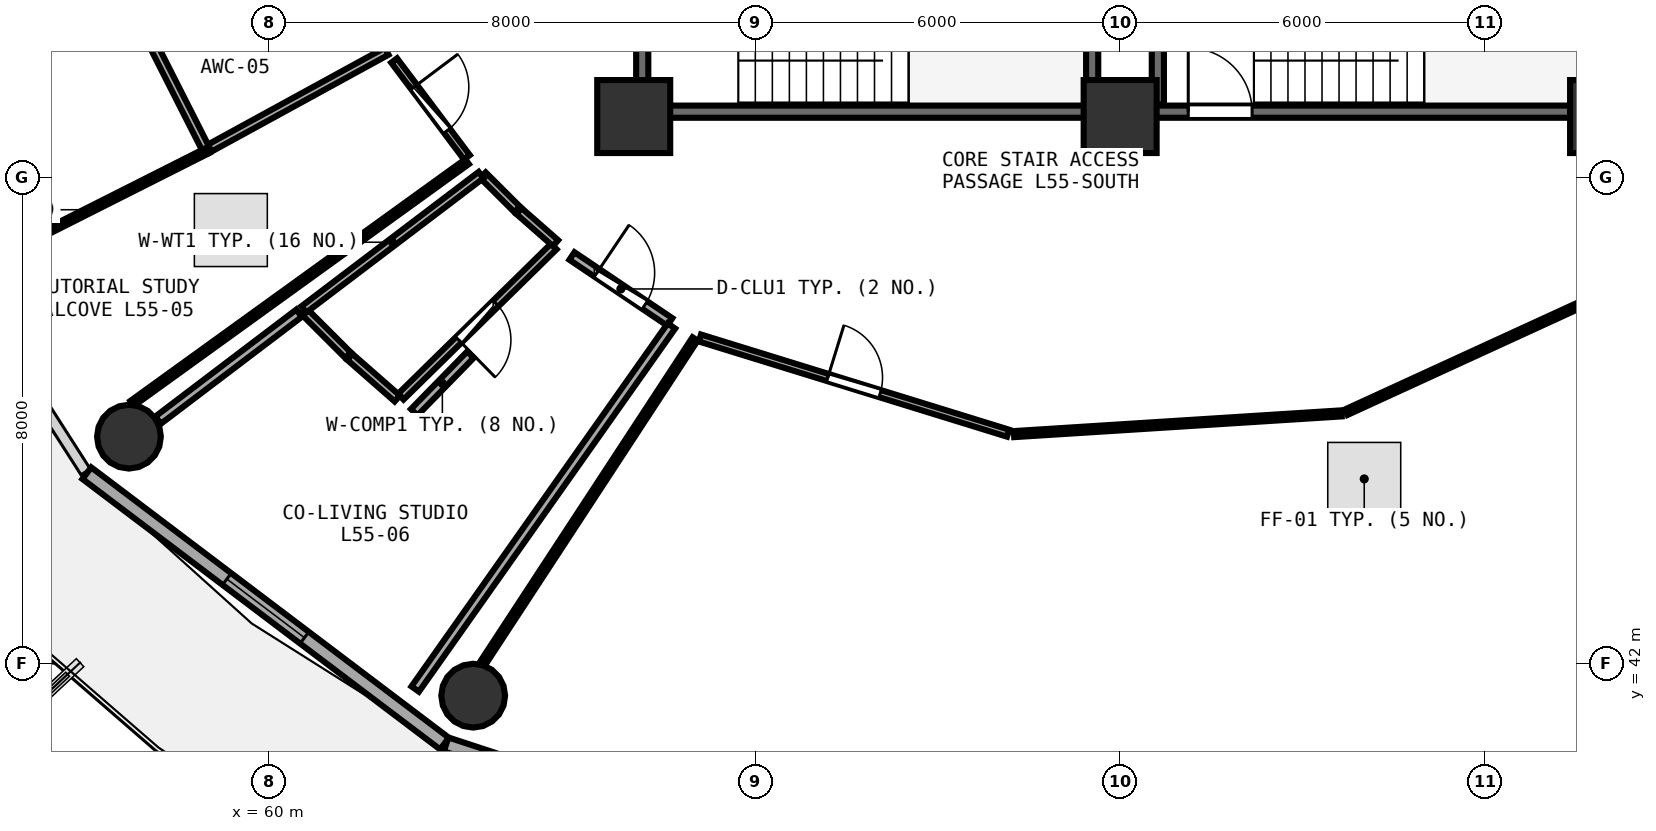
"""IFC4 building model, lengths in metres.
Left out: names, types, materials, properties, quantities, classifications, styles, units other than length and angle.
Written with IfcOpenShell. Run it as: python <this file> out.ifc"""

import sys

from ifc_helpers import new_model, si_unit, direction, frame, frame_2d, origin, origin_2d, place, context, subcontext, project, spatial, rectangle, circle, extrude, element, fill, save


model = new_model("IFC4")
c1 = context("Model", 3, precision=1e-05, world=origin(), true_north=direction((0.0, 1.0)))
c2 = subcontext(c1, "Body", "Model", "MODEL_VIEW")
j1 = project(units=[si_unit("LENGTHUNIT", "METRE"), si_unit("PLANEANGLEUNIT", "RADIAN")], contexts=[c1])
p1 = place(None, origin())
s1 = spatial("IfcSite", under=j1, at=p1, CompositionType="ELEMENT")
p2 = place(p1, origin())
s2 = spatial("IfcBuilding", under=s1, at=p2, CompositionType="ELEMENT")
p3 = place(p2, frame((0.0, 0.0, 215.7)))
s3 = spatial("IfcBuildingStorey", under=s2, at=p3, CompositionType="ELEMENT", Elevation=215.7)
for number, where, z_axis, x_axis in (
    (1, (66.0, 51.0, 0.0), (0.0, 0.0, 1.0), (1.0, 0.0, 0.0)),
    (2, (74.0, 51.0, 0.0), (0.0, 0.0, 1.0), (1.0, 0.0, 0.0)),
    (3, (82.0, 51.0, 0.0), (0.0, 0.0, 1.0), (1.0, 0.0, 0.0)),
):
    element("IfcColumn", number, at=place(p3, frame(where, z_axis=z_axis, x_axis=x_axis)), inside=s3, PredefinedType="PILASTER", context=c2, shape_type="SweptSolid", body=[
        extrude(rectangle(XDim=1.2, YDim=1.2, at=origin_2d()), origin(), (0.0, 0.0, 1.0), 3.75),
    ])
for number, where, z_axis, x_axis in (
    (4, (57.698, 45.736, 0.0), (0.0, 0.0, 1.0), (1.0, 0.0, 0.0)),
    (5, (63.36, 41.476, 0.0), (0.0, 0.0, 1.0), (1.0, 0.0, 0.0)),
):
    element("IfcColumn", number, at=place(p3, frame(where, z_axis=z_axis, x_axis=x_axis)), inside=s3, PredefinedType="COLUMN", context=c2, shape_type="SweptSolid", body=[
        extrude(circle(Radius=0.525, at=origin_2d()), origin(), (0.0, 0.0, 1.0), 3.75),
    ])
p4 = place(p3, frame((57.006, 45.135, 0.0), z_axis=(0.0, 0.0, 1.0), x_axis=(0.797701674595, -0.603052268338, 0.0)))
e6 = element("IfcWall", 6, at=p4, inside=s3, PredefinedType="SOLIDWALL", context=c2, shape_type="SweptSolid", body=[
    extrude(rectangle(XDim=7.374, YDim=0.24, at=frame_2d((3.687, 0.0))), origin(), (0.0, 0.0, 1.0), 3.475),
])
p5 = place(p4, frame((2.887, 0.0, 0.85)))
e7 = element("IfcOpeningElement", 7, at=p5, cuts=e6, PredefinedType="OPENING", context=c2, shape_type="SweptSolid", body=[
    extrude(rectangle(XDim=1.6, YDim=1.45, at=frame_2d((0.8, 0.725))), frame((0.0, 0.13, 0.0), z_axis=(0.0, -1.0, 0.0), x_axis=(1.0, 0.0, 0.0)), (0.0, 0.0, 1.0), 0.26),
])
p6 = place(p3, frame((62.914, 40.675, 0.0), z_axis=(0.0, 0.0, 1.0), x_axis=(0.95022142767, -0.31157541366, 0.0)))
e8 = element("IfcWall", 8, at=p6, inside=s3, PredefinedType="SOLIDWALL", context=c2, shape_type="SweptSolid", body=[
    extrude(rectangle(XDim=7.594, YDim=0.24, at=frame_2d((3.797, 0.0))), origin(), (0.0, 0.0, 1.0), 3.475),
])
p7 = place(p6, frame((2.997, 0.0, 0.85)))
e9 = element("IfcOpeningElement", 9, at=p7, cuts=e8, PredefinedType="OPENING", context=c2, shape_type="SweptSolid", body=[
    extrude(rectangle(XDim=1.6, YDim=1.45, at=frame_2d((0.8, 0.725))), frame((0.0, 0.13, 0.0), z_axis=(0.0, -1.0, 0.0), x_axis=(1.0, 0.0, 0.0)), (0.0, 0.0, 1.0), 0.26),
])
p8 = place(p3, frame((74.0, 51.08, 0.0), z_axis=(0.0, 0.0, 1.0), x_axis=(1.0, 0.0, 0.0)))
e10 = element("IfcWall", 10, at=p8, inside=s3, PredefinedType="SHEAR", context=c2, shape_type="SweptSolid", body=[
    extrude(rectangle(XDim=7.9, YDim=0.2, at=frame_2d((3.95, 0.0))), origin(), (0.0, 0.0, 1.0), 3.49),
])
p9 = place(p8, frame((1.12, 0.0, 0.0)))
e11 = element("IfcOpeningElement", 11, at=p9, cuts=e10, PredefinedType="OPENING", context=c2, shape_type="SweptSolid", body=[
    extrude(rectangle(XDim=1.05, YDim=2.1, at=frame_2d((0.525, 1.05))), frame((0.0, 0.11, 0.0), z_axis=(0.0, -1.0, 0.0), x_axis=(1.0, 0.0, 0.0)), (0.0, 0.0, 1.0), 0.22),
])
p10 = place(p3, frame((74.62, 54.27, 0.0), z_axis=(0.0, 0.0, 1.0), x_axis=(0.0, -1.0, 0.0)))
e12 = element("IfcWall", 12, at=p10, inside=s3, PredefinedType="SHEAR", context=c2, shape_type="SweptSolid", body=[
    extrude(rectangle(XDim=3.07, YDim=0.2, at=frame_2d((1.535, 0.0))), origin(), (0.0, 0.0, 1.0), 3.49),
])
p11 = place(p3, frame((66.26, 51.08, 0.0), z_axis=(0.0, 0.0, 1.0), x_axis=(1.0, 0.0, 0.0)))
e13 = element("IfcWall", 13, at=p11, inside=s3, PredefinedType="SHEAR", context=c2, shape_type="SweptSolid", body=[
    extrude(rectangle(XDim=7.16, YDim=0.2, at=frame_2d((3.58, 0.0))), origin(), (0.0, 0.0, 1.0), 3.49),
])
p12 = place(p3, frame((73.54, 51.2, 0.0), z_axis=(0.0, 0.0, 1.0), x_axis=(0.0, 1.0, 0.0)))
e14 = element("IfcWall", 14, at=p12, inside=s3, PredefinedType="SHEAR", context=c2, shape_type="SweptSolid", body=[
    extrude(rectangle(XDim=3.07, YDim=0.2, at=frame_2d((1.535, 0.0))), origin(), (0.0, 0.0, 1.0), 3.49),
])
p13 = place(p3, frame((66.14, 54.27, 0.0), z_axis=(0.0, 0.0, 1.0), x_axis=(0.0, -1.0, 0.0)))
e15 = element("IfcWall", 15, at=p13, inside=s3, PredefinedType="SHEAR", context=c2, shape_type="SweptSolid", body=[
    extrude(rectangle(XDim=3.07, YDim=0.2, at=frame_2d((1.535, 0.0))), origin(), (0.0, 0.0, 1.0), 3.49),
])
p14 = place(p13, frame((1.01, 0.0, 0.0)))
e16 = element("IfcOpeningElement", 16, at=p14, cuts=e15, PredefinedType="OPENING", context=c2, shape_type="SweptSolid", body=[
    extrude(rectangle(XDim=1.05, YDim=2.1, at=frame_2d((0.525, 1.05))), frame((0.0, 0.11, 0.0), z_axis=(0.0, -1.0, 0.0), x_axis=(1.0, 0.0, 0.0)), (0.0, 0.0, 1.0), 0.22),
])
p15 = place(p3, frame((67.088, 47.358, 0.0), z_axis=(0.0, 0.0, 1.0), x_axis=(0.955451026591, -0.295149683696, 0.0)))
e17 = element("IfcWall", 17, at=p15, inside=s3, PredefinedType="PARTITIONING", context=c2, shape_type="SweptSolid", body=[
    extrude(rectangle(XDim=5.305, YDim=0.12, at=frame_2d((2.652, 0.0))), origin(), (0.0, 0.0, 1.0), 3.235),
])
p16 = place(p15, frame((2.202, 0.0, 0.0)))
e18 = element("IfcOpeningElement", 18, at=p16, cuts=e17, PredefinedType="OPENING", context=c2, shape_type="SweptSolid", body=[
    extrude(rectangle(XDim=0.9, YDim=2.08, at=frame_2d((0.45, 1.04))), frame((0.0, 0.07, 0.0), z_axis=(0.0, -1.0, 0.0), x_axis=(1.0, 0.0, 0.0)), (0.0, 0.0, 1.0), 0.14),
])
p17 = place(p3, frame((62.06, 51.922, 0.0), z_axis=(0.0, 0.0, 1.0), x_axis=(0.600647163637, -0.799514218019, 0.0)))
e19 = element("IfcWall", 19, at=p17, inside=s3, PredefinedType="PARTITIONING", context=c2, shape_type="SweptSolid", body=[
    extrude(rectangle(XDim=1.991, YDim=0.12, at=frame_2d((0.996, 0.0))), origin(), (0.0, 0.0, 1.0), 3.025),
])
p18 = place(p17, frame((0.546, 0.0, 0.0)))
e20 = element("IfcOpeningElement", 20, at=p18, cuts=e19, PredefinedType="OPENING", context=c2, shape_type="SweptSolid", body=[
    extrude(rectangle(XDim=0.9, YDim=2.08, at=frame_2d((0.45, 1.04))), frame((0.0, 0.07, 0.0), z_axis=(0.0, -1.0, 0.0), x_axis=(1.0, 0.0, 0.0)), (0.0, 0.0, 1.0), 0.14),
])
p19 = place(p3, frame((64.686, 48.863, 0.0), z_axis=(0.0, 0.0, 1.0), x_axis=(-0.713685369918, -0.700466410875, 0.0)))
e21 = element("IfcWall", 21, at=p19, inside=s3, PredefinedType="PLUMBINGWALL", context=c2, shape_type="SweptSolid", body=[
    extrude(rectangle(XDim=3.528, YDim=0.13, at=frame_2d((1.764, 0.0))), origin(), (0.0, 0.0, 1.0), 3.175),
])
p20 = place(p19, frame((1.334, 0.0, 0.0)))
e22 = element("IfcOpeningElement", 22, at=p20, cuts=e21, PredefinedType="OPENING", context=c2, shape_type="SweptSolid", body=[
    extrude(rectangle(XDim=0.86, YDim=2.05, at=frame_2d((0.43, 1.025))), frame((0.0, 0.075, 0.0), z_axis=(0.0, -1.0, 0.0), x_axis=(1.0, 0.0, 0.0)), (0.0, 0.0, 1.0), 0.15),
])
p21 = place(p3, frame((64.984, 48.707, 0.0), z_axis=(0.0, 0.0, 1.0), x_axis=(0.829408373073, -0.558642775553, 0.0)))
e23 = element("IfcWall", 23, at=p21, inside=s3, PredefinedType="PARTITIONING", context=c2, shape_type="SweptSolid", body=[
    extrude(rectangle(XDim=1.94, YDim=0.15, at=frame_2d((0.97, 0.0))), origin(), (0.0, 0.0, 1.0), 3.025),
])
p22 = place(p21, frame((0.495, 0.0, 0.0)))
e24 = element("IfcOpeningElement", 24, at=p22, cuts=e23, PredefinedType="OPENING", context=c2, shape_type="SweptSolid", body=[
    extrude(rectangle(XDim=0.95, YDim=2.08, at=frame_2d((0.475, 1.04))), frame((0.0, 0.085, 0.0), z_axis=(0.0, -1.0, 0.0), x_axis=(1.0, 0.0, 0.0)), (0.0, 0.0, 1.0), 0.17),
])
p23 = place(p3, frame((72.254, 45.778, 0.0), z_axis=(0.0, 0.0, 1.0), x_axis=(0.99800477295, 0.063138523658, 0.0)))
e25 = element("IfcWall", 25, at=p23, inside=s3, PredefinedType="PARTITIONING", context=c2, shape_type="SweptSolid", body=[
    extrude(rectangle(XDim=5.398, YDim=0.1, at=frame_2d((2.699, 0.0))), origin(), (0.0, 0.0, 1.0), 3.025),
])
p24 = place(p3, frame((77.717, 46.138, 0.0), z_axis=(0.0, 0.0, 1.0), x_axis=(0.908908137454, 0.416996400069, 0.0)))
e26 = element("IfcWall", 26, at=p24, inside=s3, PredefinedType="PARTITIONING", context=c2, shape_type="SweptSolid", body=[
    extrude(rectangle(XDim=5.289, YDim=0.1, at=frame_2d((2.645, 0.0))), origin(), (0.0, 0.0, 1.0), 3.235),
])
p25 = place(p3, frame((63.514, 42.004, 0.0), z_axis=(0.0, 0.0, 1.0), x_axis=(0.547776057645, 0.836625000028, 0.0)))
e27 = element("IfcWall", 27, at=p25, inside=s3, PredefinedType="PARTITIONING", context=c2, shape_type="SweptSolid", body=[
    extrude(rectangle(XDim=6.381, YDim=0.1, at=frame_2d((3.19, 0.0))), origin(), (0.0, 0.0, 1.0), 3.025),
])
p26 = place(p3, frame((61.052, 53.791, 0.0), z_axis=(0.0, 0.0, 1.0), x_axis=(-0.950863645771, -0.309609959708, 0.0)))
e28 = element("IfcWall", 28, at=p26, inside=s3, PredefinedType="PARTITIONING", context=c2, shape_type="SweptSolid", body=[
    extrude(rectangle(XDim=6.87, YDim=0.1, at=frame_2d((3.435, 0.0))), origin(), (0.0, 0.0, 1.0), 3.175),
])
p27 = place(p3, frame((61.937, 52.073, 0.0), z_axis=(0.0, 0.0, 1.0), x_axis=(-0.877295143091, -0.479951280767, 0.0)))
e29 = element("IfcWall", 29, at=p27, inside=s3, PredefinedType="PLUMBINGWALL", context=c2, shape_type="SweptSolid", body=[
    extrude(rectangle(XDim=3.36, YDim=0.13, at=frame_2d((1.68, 0.0))), origin(), (0.0, 0.0, 1.0), 3.025),
])
p28 = place(p3, frame((58.962, 50.469, 0.0), z_axis=(0.0, 0.0, 1.0), x_axis=(-0.452384505313, 0.891822997771, 0.0)))
e30 = element("IfcWall", 30, at=p28, inside=s3, PredefinedType="PLUMBINGWALL", context=c2, shape_type="SweptSolid", body=[
    extrude(rectangle(XDim=2.018, YDim=0.13, at=frame_2d((1.009, 0.0))), origin(), (0.0, 0.0, 1.0), 3.025),
])
p29 = place(p3, frame((63.26, 50.259, 0.0), z_axis=(0.0, 0.0, 1.0), x_axis=(-0.810850730514, -0.585253016076, 0.0)))
e31 = element("IfcWall", 31, at=p29, inside=s3, PredefinedType="PARTITIONING", context=c2, shape_type="SweptSolid", body=[
    extrude(rectangle(XDim=6.793, YDim=0.1, at=frame_2d((3.396, 0.0))), origin(), (0.0, 0.0, 1.0), 3.175),
])
p30 = place(p3, frame((55.125, 48.491, 0.0), z_axis=(0.0, 0.0, 1.0), x_axis=(0.892902240534, 0.450250584507, 0.0)))
e32 = element("IfcWall", 32, at=p30, inside=s3, PredefinedType="PARTITIONING", context=c2, shape_type="SweptSolid", body=[
    extrude(rectangle(XDim=4.337, YDim=0.1, at=frame_2d((2.169, 0.0))), origin(), (0.0, 0.0, 1.0), 3.075),
])
p31 = place(p3, frame((63.519, 50.036, 0.0), z_axis=(0.0, 0.0, 1.0), x_axis=(0.708179895313, -0.706032036012, 0.0)))
e33 = element("IfcWall", 33, at=p31, inside=s3, PredefinedType="PLUMBINGWALL", context=c2, shape_type="SweptSolid", body=[
    extrude(rectangle(XDim=0.796, YDim=0.13, at=frame_2d((0.398, 0.0))), origin(), (0.0, 0.0, 1.0), 3.025),
])
p32 = place(p3, frame((64.112, 49.447, 0.0), z_axis=(0.0, 0.0, 1.0), x_axis=(0.751480759656, -0.659755005943, 0.0)))
e34 = element("IfcWall", 34, at=p32, inside=s3, PredefinedType="PLUMBINGWALL", context=c2, shape_type="SweptSolid", body=[
    extrude(rectangle(XDim=0.801, YDim=0.13, at=frame_2d((0.401, 0.0))), origin(), (0.0, 0.0, 1.0), 3.48),
])
p33 = place(p3, frame((62.111, 46.363, 0.0), z_axis=(0.0, 0.0, 1.0), x_axis=(-0.751599507382, 0.659619724162, 0.0)))
e35 = element("IfcWall", 35, at=p33, inside=s3, PredefinedType="PLUMBINGWALL", context=c2, shape_type="SweptSolid", body=[
    extrude(rectangle(XDim=1.038, YDim=0.13, at=frame_2d((0.519, 0.0))), origin(), (0.0, 0.0, 1.0), 3.48),
])
p34 = place(p3, frame((61.302, 47.075, 0.0), z_axis=(0.0, 0.0, 1.0), x_axis=(-0.707936648292, 0.706275938996, 0.0)))
e36 = element("IfcWall", 36, at=p34, inside=s3, PredefinedType="PLUMBINGWALL", context=c2, shape_type="SweptSolid", body=[
    extrude(rectangle(XDim=1.029, YDim=0.13, at=frame_2d((0.515, 0.0))), origin(), (0.0, 0.0, 1.0), 3.025),
])
p35 = place(p3, frame((60.575, 47.828, 0.0), z_axis=(0.0, 0.0, 1.0), x_axis=(0.79681650582, 0.604221363453, 0.0)))
e37 = element("IfcWall", 37, at=p35, inside=s3, PredefinedType="PLUMBINGWALL", context=c2, shape_type="SweptSolid", body=[
    extrude(rectangle(XDim=3.657, YDim=0.13, at=frame_2d((1.829, 0.0))), origin(), (0.0, 0.0, 1.0), 3.175),
])
p36 = place(p3, frame((66.62, 47.556, 0.0), z_axis=(0.0, 0.0, 1.0), x_axis=(-0.576552043051, -0.817060427174, 0.0)))
e38 = element("IfcWall", 38, at=p36, inside=s3, PredefinedType="PARTITIONING", context=c2, shape_type="SweptSolid", body=[
    extrude(rectangle(XDim=7.309, YDim=0.15, at=frame_2d((3.654, 0.0))), origin(), (0.0, 0.0, 1.0), 3.025),
])
p37 = place(p3, frame((58.177, 46.007, 0.0), z_axis=(0.0, 0.0, 1.0), x_axis=(0.796666201995, 0.604419525329, 0.0)))
e39 = element("IfcWall", 39, at=p37, inside=s3, PredefinedType="PARTITIONING", context=c2, shape_type="SweptSolid", body=[
    extrude(rectangle(XDim=2.911, YDim=0.15, at=frame_2d((1.455, 0.0))), origin(), (0.0, 0.0, 1.0), 3.025),
])
p38 = place(p3, frame((62.39, 46.137, 0.0), z_axis=(0.0, 0.0, 1.0), x_axis=(0.699044346204, 0.715078318816, 0.0)))
e40 = element("IfcWall", 40, at=p38, inside=s3, PredefinedType="PARTITIONING", context=c2, shape_type="SweptSolid", body=[
    extrude(rectangle(XDim=1.325, YDim=0.15, at=frame_2d((0.662, 0.0))), origin(), (0.0, 0.0, 1.0), 3.175),
])
p39 = place(p5, origin())
e41 = element("IfcWindow", 41, at=p39, inside=s3, PartitioningType="SINGLE_PANEL", PredefinedType="WINDOW", context=c2, shape_type="SweptSolid", body=[
    extrude(rectangle(XDim=1.6, YDim=1.45, at=frame_2d((0.8, 0.725))), frame((0.0, 0.03, 0.0), z_axis=(0.0, -1.0, 0.0), x_axis=(1.0, 0.0, 0.0)), (0.0, 0.0, 1.0), 0.06),
])
fill(e7, e41)
p40 = place(p9, origin())
e42 = element("IfcDoor", 42, at=p40, inside=s3, OperationType="SINGLE_SWING_LEFT", PredefinedType="DOOR", context=c2, shape_type="SweptSolid", body=[
    extrude(rectangle(XDim=1.05, YDim=2.1, at=frame_2d((0.525, 1.05))), frame((0.0, 0.025, 0.0), z_axis=(0.0, -1.0, 0.0), x_axis=(1.0, 0.0, 0.0)), (0.0, 0.0, 1.0), 0.05),
])
fill(e11, e42)
p41 = place(p16, origin())
e43 = element("IfcDoor", 43, at=p41, inside=s3, OperationType="SINGLE_SWING_LEFT", PredefinedType="DOOR", context=c2, shape_type="SweptSolid", body=[
    extrude(rectangle(XDim=0.9, YDim=2.08, at=frame_2d((0.45, 1.04))), frame((0.0, 0.025, 0.0), z_axis=(0.0, -1.0, 0.0), x_axis=(1.0, 0.0, 0.0)), (0.0, 0.0, 1.0), 0.05),
])
fill(e18, e43)
p42 = place(p18, origin())
e44 = element("IfcDoor", 44, at=p42, inside=s3, OperationType="SINGLE_SWING_LEFT", PredefinedType="DOOR", context=c2, shape_type="SweptSolid", body=[
    extrude(rectangle(XDim=0.9, YDim=2.08, at=frame_2d((0.45, 1.04))), frame((0.0, 0.025, 0.0), z_axis=(0.0, -1.0, 0.0), x_axis=(1.0, 0.0, 0.0)), (0.0, 0.0, 1.0), 0.05),
])
fill(e20, e44)
p43 = place(p20, origin())
e45 = element("IfcDoor", 45, at=p43, inside=s3, OperationType="SINGLE_SWING_RIGHT", PredefinedType="DOOR", context=c2, shape_type="SweptSolid", body=[
    extrude(rectangle(XDim=0.86, YDim=2.05, at=frame_2d((0.43, 1.025))), frame((0.0, 0.025, 0.0), z_axis=(0.0, -1.0, 0.0), x_axis=(1.0, 0.0, 0.0)), (0.0, 0.0, 1.0), 0.05),
])
fill(e22, e45)
p44 = place(p22, origin())
e46 = element("IfcDoor", 46, at=p44, inside=s3, OperationType="SINGLE_SWING_LEFT", PredefinedType="DOOR", context=c2, shape_type="SweptSolid", body=[
    extrude(rectangle(XDim=0.95, YDim=2.08, at=frame_2d((0.475, 1.04))), frame((0.0, 0.025, 0.0), z_axis=(0.0, -1.0, 0.0), x_axis=(1.0, 0.0, 0.0)), (0.0, 0.0, 1.0), 0.05),
])
fill(e24, e46)
save(model, sys.argv[1])
